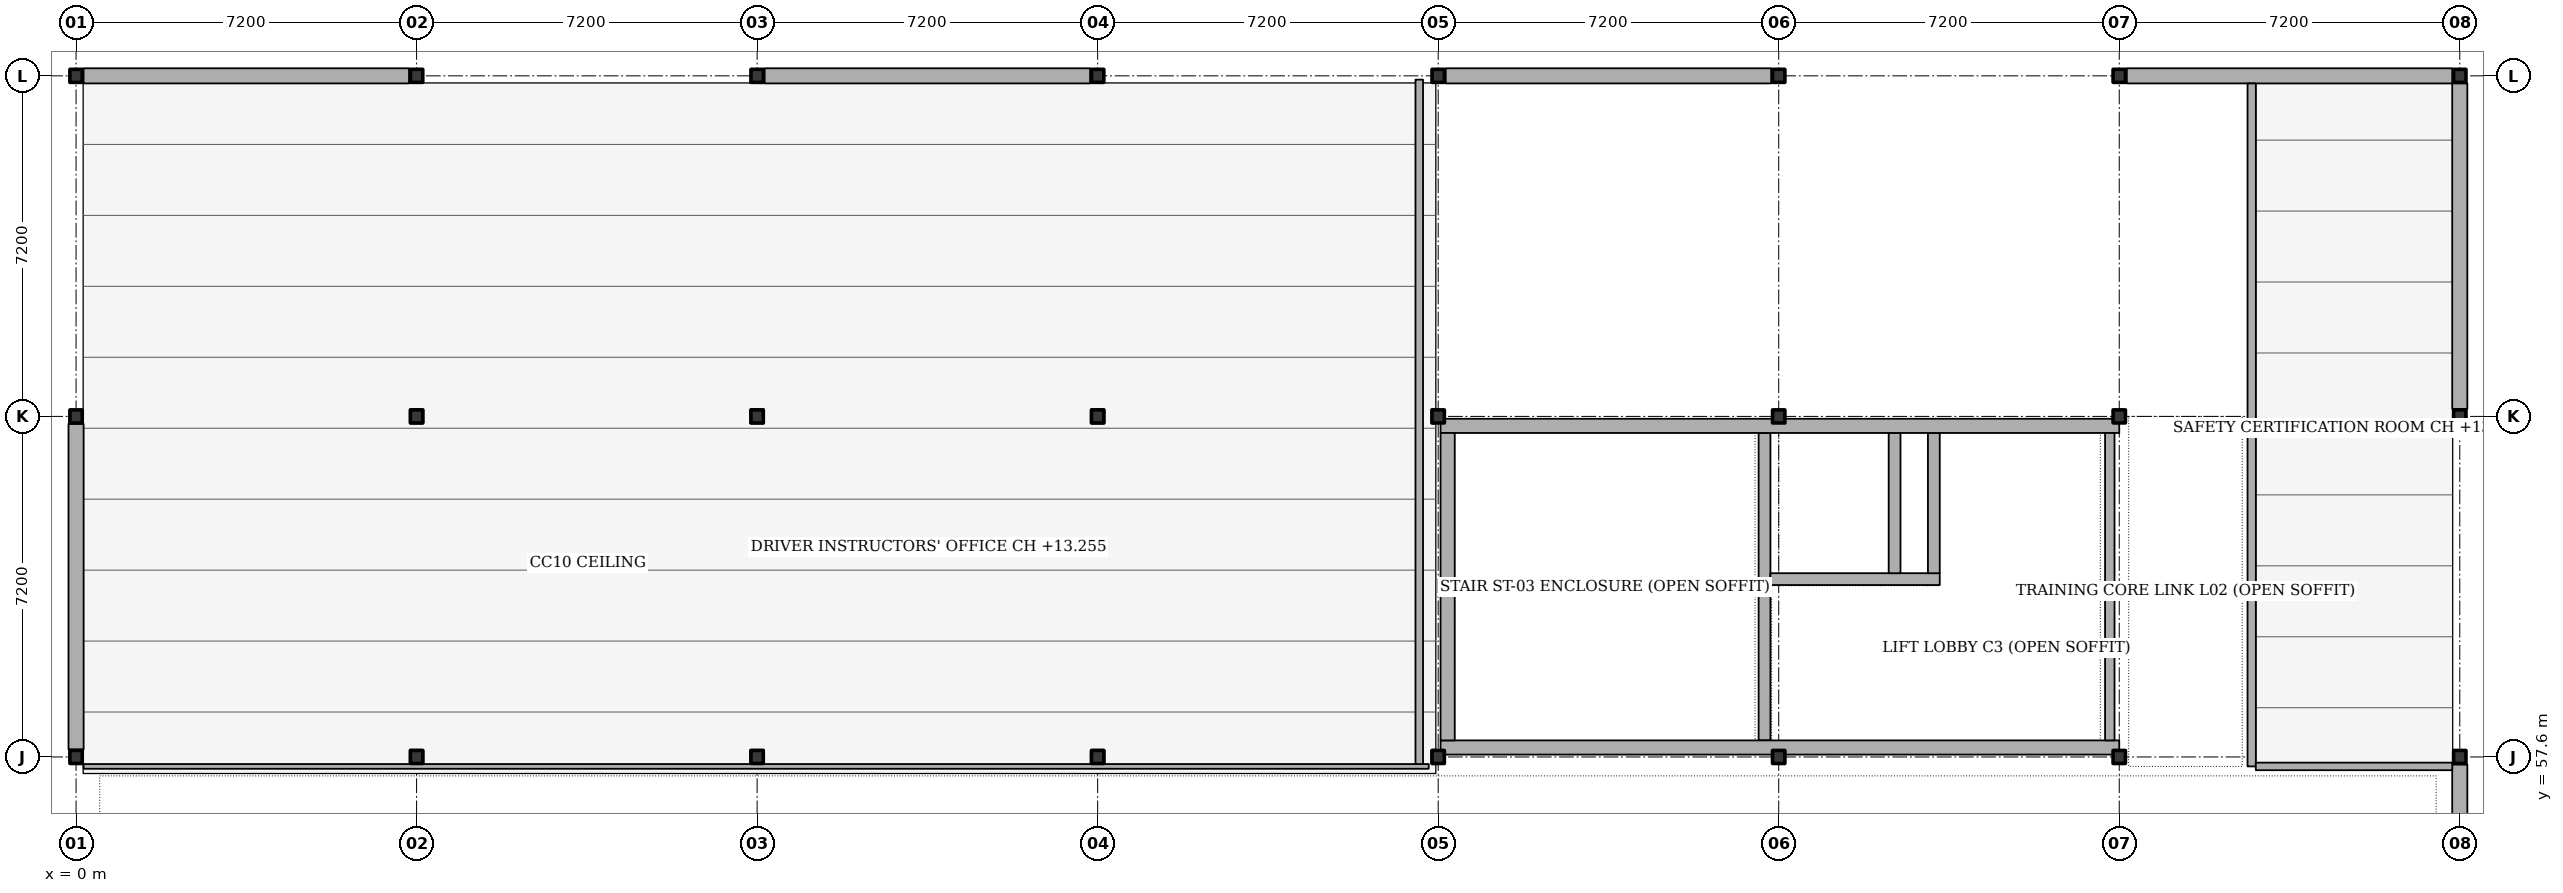
"""IFC4 building model, lengths in metres.
Left out: names, types, materials, properties, quantities, classifications, styles, units other than length and angle.
Written with IfcOpenShell. Run it as: python <this file> out.ifc"""

import sys

from ifc_helpers import new_model, si_unit, direction, frame, frame_2d, origin, origin_2d, place, context, subcontext, project, spatial, rectangle, i_section, extrude, element, fill, save


model = new_model("IFC4")
c1 = context("Model", 3, precision=1e-05, world=origin(), true_north=direction((0.0, 1.0)))
c2 = subcontext(c1, "Body", "Model", "MODEL_VIEW")
j1 = project(units=[si_unit("LENGTHUNIT", "METRE"), si_unit("PLANEANGLEUNIT", "RADIAN")], contexts=[c1])
p1 = place(None, origin())
s1 = spatial("IfcSite", under=j1, at=p1, CompositionType="ELEMENT")
p2 = place(p1, origin())
s2 = spatial("IfcBuilding", under=s1, at=p2, CompositionType="ELEMENT")
p3 = place(p2, frame((0.0, 0.0, 9.9)))
s3 = spatial("IfcBuildingStorey", under=s2, at=p3, CompositionType="ELEMENT", Elevation=9.9)
for number, where, z_axis, x_axis in (
    (1, (0.0, 57.6, 0.0), (0.0, 0.0, 1.0), (1.0, 0.0, 0.0)),
    (2, (0.0, 64.8, 0.0), (0.0, 0.0, 1.0), (1.0, 0.0, 0.0)),
    (3, (0.0, 72.0, 0.0), (0.0, 0.0, 1.0), (1.0, 0.0, 0.0)),
    (4, (7.2, 57.6, 0.0), (0.0, 0.0, 1.0), (1.0, 0.0, 0.0)),
    (5, (7.2, 64.8, 0.0), (0.0, 0.0, 1.0), (1.0, 0.0, 0.0)),
    (6, (7.2, 72.0, 0.0), (0.0, 0.0, 1.0), (1.0, 0.0, 0.0)),
    (7, (14.4, 57.6, 0.0), (0.0, 0.0, 1.0), (1.0, 0.0, 0.0)),
    (8, (14.4, 64.8, 0.0), (0.0, 0.0, 1.0), (1.0, 0.0, 0.0)),
    (9, (14.4, 72.0, 0.0), (0.0, 0.0, 1.0), (1.0, 0.0, 0.0)),
    (10, (21.6, 57.6, 0.0), (0.0, 0.0, 1.0), (1.0, 0.0, 0.0)),
    (11, (21.6, 64.8, 0.0), (0.0, 0.0, 1.0), (1.0, 0.0, 0.0)),
    (12, (21.6, 72.0, 0.0), (0.0, 0.0, 1.0), (1.0, 0.0, 0.0)),
    (13, (28.8, 57.6, 0.0), (0.0, 0.0, 1.0), (1.0, 0.0, 0.0)),
    (14, (28.8, 64.8, 0.0), (0.0, 0.0, 1.0), (1.0, 0.0, 0.0)),
    (15, (28.8, 72.0, 0.0), (0.0, 0.0, 1.0), (1.0, 0.0, 0.0)),
    (16, (36.0, 57.6, 0.0), (0.0, 0.0, 1.0), (1.0, 0.0, 0.0)),
    (17, (36.0, 64.8, 0.0), (0.0, 0.0, 1.0), (1.0, 0.0, 0.0)),
    (18, (36.0, 72.0, 0.0), (0.0, 0.0, 1.0), (1.0, 0.0, 0.0)),
    (19, (43.2, 57.6, 0.0), (0.0, 0.0, 1.0), (1.0, 0.0, 0.0)),
    (20, (43.2, 64.8, 0.0), (0.0, 0.0, 1.0), (1.0, 0.0, 0.0)),
    (21, (43.2, 72.0, 0.0), (0.0, 0.0, 1.0), (1.0, 0.0, 0.0)),
    (22, (50.4, 57.6, 0.0), (0.0, 0.0, 1.0), (1.0, 0.0, 0.0)),
    (23, (50.4, 64.8, 0.0), (0.0, 0.0, 1.0), (1.0, 0.0, 0.0)),
    (24, (50.4, 72.0, 0.0), (0.0, 0.0, 1.0), (1.0, 0.0, 0.0)),
):
    element("IfcColumn", number, at=place(p3, frame(where, z_axis=z_axis, x_axis=x_axis)), inside=s3, PredefinedType="COLUMN", context=c2, shape_type="SweptSolid", body=[
        extrude(i_section(OverallWidth=0.261, OverallDepth=0.276, WebThickness=0.015, FlangeThickness=0.025, FilletRadius=0.013, at=origin_2d()), origin(), (0.0, 0.0, 1.0), 4.5),
    ])
p4 = place(p3, frame((0.0, 57.758, 0.0), z_axis=(0.0, 0.0, 1.0), x_axis=(0.0, 1.0, 0.0)))
e25 = element("IfcWall", 25, at=p4, inside=s3, PredefinedType="SOLIDWALL", context=c2, shape_type="SweptSolid", body=[
    extrude(rectangle(XDim=6.884, YDim=0.32, at=frame_2d((3.442, 0.0))), origin(), (0.0, 0.0, 1.0), 3.8),
])
p5 = place(p4, frame((3.042, 0.0, 1.05)))
e26 = element("IfcOpeningElement", 26, at=p5, cuts=e25, PredefinedType="OPENING", context=c2, shape_type="SweptSolid", body=[
    extrude(rectangle(XDim=0.8, YDim=1.4, at=frame_2d((0.4, 0.7))), frame((0.0, 0.17, 0.0), z_axis=(0.0, -1.0, 0.0), x_axis=(1.0, 0.0, 0.0)), (0.0, 0.0, 1.0), 0.34),
])
p6 = place(p3, frame((0.158, 72.0, 0.0), z_axis=(0.0, 0.0, 1.0), x_axis=(1.0, 0.0, 0.0)))
e27 = element("IfcWall", 27, at=p6, inside=s3, PredefinedType="SOLIDWALL", context=c2, shape_type="SweptSolid", body=[
    extrude(rectangle(XDim=6.884, YDim=0.32, at=frame_2d((3.442, 0.0))), origin(), (0.0, 0.0, 1.0), 3.8),
])
p7 = place(p6, frame((2.842, 0.0, 0.0)))
e28 = element("IfcOpeningElement", 28, at=p7, cuts=e27, PredefinedType="OPENING", context=c2, shape_type="SweptSolid", body=[
    extrude(rectangle(XDim=1.2, YDim=2.15, at=frame_2d((0.6, 1.075))), frame((0.0, 0.17, 0.0), z_axis=(0.0, -1.0, 0.0), x_axis=(1.0, 0.0, 0.0)), (0.0, 0.0, 1.0), 0.34),
])
p8 = place(p3, frame((14.558, 72.0, 0.0), z_axis=(0.0, 0.0, 1.0), x_axis=(1.0, 0.0, 0.0)))
e29 = element("IfcWall", 29, at=p8, inside=s3, PredefinedType="SOLIDWALL", context=c2, shape_type="SweptSolid", body=[
    extrude(rectangle(XDim=6.884, YDim=0.32, at=frame_2d((3.442, 0.0))), origin(), (0.0, 0.0, 1.0), 3.414),
])
p9 = place(p8, frame((2.612, 0.0, 1.05)))
e30 = element("IfcOpeningElement", 30, at=p9, cuts=e29, PredefinedType="OPENING", context=c2, shape_type="SweptSolid", body=[
    extrude(rectangle(XDim=1.66, YDim=1.8, at=frame_2d((0.83, 0.9))), frame((0.0, 0.17, 0.0), z_axis=(0.0, -1.0, 0.0), x_axis=(1.0, 0.0, 0.0)), (0.0, 0.0, 1.0), 0.34),
])
p10 = place(p3, frame((28.958, 72.0, 0.0), z_axis=(0.0, 0.0, 1.0), x_axis=(1.0, 0.0, 0.0)))
e31 = element("IfcWall", 31, at=p10, inside=s3, PredefinedType="SOLIDWALL", context=c2, shape_type="SweptSolid", body=[
    extrude(rectangle(XDim=6.884, YDim=0.32, at=frame_2d((3.442, 0.0))), origin(), (0.0, 0.0, 1.0), 3.503),
])
p11 = place(p10, frame((2.162, 0.0, 1.05)))
e32 = element("IfcOpeningElement", 32, at=p11, cuts=e31, PredefinedType="OPENING", context=c2, shape_type="SweptSolid", body=[
    extrude(rectangle(XDim=2.56, YDim=1.55, at=frame_2d((1.28, 0.775))), frame((0.0, 0.17, 0.0), z_axis=(0.0, -1.0, 0.0), x_axis=(1.0, 0.0, 0.0)), (0.0, 0.0, 1.0), 0.34),
])
p12 = place(p3, frame((43.358, 72.0, 0.0), z_axis=(0.0, 0.0, 1.0), x_axis=(1.0, 0.0, 0.0)))
e33 = element("IfcWall", 33, at=p12, inside=s3, PredefinedType="SOLIDWALL", context=c2, shape_type="SweptSolid", body=[
    extrude(rectangle(XDim=6.884, YDim=0.32, at=frame_2d((3.442, 0.0))), origin(), (0.0, 0.0, 1.0), 3.615),
])
p13 = place(p12, frame((3.638, 0.0, 1.05)))
e34 = element("IfcOpeningElement", 34, at=p13, cuts=e33, PredefinedType="OPENING", context=c2, shape_type="SweptSolid", body=[
    extrude(rectangle(XDim=2.1, YDim=1.8, at=frame_2d((1.05, 0.9))), frame((0.0, 0.17, 0.0), z_axis=(0.0, -1.0, 0.0), x_axis=(1.0, 0.0, 0.0)), (0.0, 0.0, 1.0), 0.34),
])
p14 = place(p3, frame((50.4, 71.842, 0.0), z_axis=(0.0, 0.0, 1.0), x_axis=(0.0, -1.0, 0.0)))
e35 = element("IfcWall", 35, at=p14, inside=s3, PredefinedType="SOLIDWALL", context=c2, shape_type="SweptSolid", body=[
    extrude(rectangle(XDim=6.884, YDim=0.32, at=frame_2d((3.442, 0.0))), origin(), (0.0, 0.0, 1.0), 3.615),
])
p15 = place(p14, frame((2.642, 0.0, 0.0)))
e36 = element("IfcOpeningElement", 36, at=p15, cuts=e35, PredefinedType="OPENING", context=c2, shape_type="SweptSolid", body=[
    extrude(rectangle(XDim=1.6, YDim=2.2, at=frame_2d((0.8, 1.1))), frame((0.0, 0.17, 0.0), z_axis=(0.0, -1.0, 0.0), x_axis=(1.0, 0.0, 0.0)), (0.0, 0.0, 1.0), 0.34),
])
p16 = place(p3, frame((50.4, 57.442, 0.0), z_axis=(0.0, 0.0, 1.0), x_axis=(0.0, -1.0, 0.0)))
e37 = element("IfcWall", 37, at=p16, inside=s3, PredefinedType="SOLIDWALL", context=c2, shape_type="SweptSolid", body=[
    extrude(rectangle(XDim=6.884, YDim=0.32, at=frame_2d((3.442, 0.0))), origin(), (0.0, 0.0, 1.0), 3.414),
])
p17 = place(p16, frame((4.058, 0.0, 1.05)))
e38 = element("IfcOpeningElement", 38, at=p17, cuts=e37, PredefinedType="OPENING", context=c2, shape_type="SweptSolid", body=[
    extrude(rectangle(XDim=1.66, YDim=1.8, at=frame_2d((0.83, 0.9))), frame((0.0, 0.17, 0.0), z_axis=(0.0, -1.0, 0.0), x_axis=(1.0, 0.0, 0.0)), (0.0, 0.0, 1.0), 0.34),
])
p18 = place(p3, frame((35.7, 57.95, 0.0), z_axis=(0.0, 0.0, 1.0), x_axis=(0.0, 1.0, 0.0)))
e39 = element("IfcWall", 39, at=p18, inside=s3, PredefinedType="SHEAR", context=c2, shape_type="SweptSolid", body=[
    extrude(rectangle(XDim=6.5, YDim=0.25, at=frame_2d((3.25, 0.0))), origin(), (0.0, 0.0, 1.0), 3.6),
])
p19 = place(p18, frame((0.95, 0.0, 0.0)))
e40 = element("IfcOpeningElement", 40, at=p19, cuts=e39, PredefinedType="OPENING", context=c2, shape_type="SweptSolid", body=[
    extrude(rectangle(XDim=1.35, YDim=2.15, at=frame_2d((0.675, 1.075))), frame((0.0, 0.135, 0.0), z_axis=(0.0, -1.0, 0.0), x_axis=(1.0, 0.0, 0.0)), (0.0, 0.0, 1.0), 0.27),
])
p20 = place(p3, frame((35.825, 61.36, 0.0), z_axis=(0.0, 0.0, 1.0), x_axis=(1.0, 0.0, 0.0)))
e41 = element("IfcWall", 41, at=p20, inside=s3, PredefinedType="SHEAR", context=c2, shape_type="SweptSolid", body=[
    extrude(rectangle(XDim=3.58, YDim=0.25, at=frame_2d((1.79, 0.0))), origin(), (0.0, 0.0, 1.0), 3.6),
])
p21 = place(p20, frame((0.775, 0.0, 0.0)))
e42 = element("IfcOpeningElement", 42, at=p21, cuts=e41, PredefinedType="OPENING", context=c2, shape_type="SweptSolid", body=[
    extrude(rectangle(XDim=1.1, YDim=2.15, at=frame_2d((0.55, 1.075))), frame((0.0, 0.135, 0.0), z_axis=(0.0, -1.0, 0.0), x_axis=(1.0, 0.0, 0.0)), (0.0, 0.0, 1.0), 0.27),
])
p22 = place(p3, frame((38.45, 61.485, 0.0), z_axis=(0.0, 0.0, 1.0), x_axis=(0.0, 1.0, 0.0)))
e43 = element("IfcWall", 43, at=p22, inside=s3, PredefinedType="SHEAR", context=c2, shape_type="SweptSolid", body=[
    extrude(rectangle(XDim=2.965, YDim=0.25, at=frame_2d((1.482, 0.0))), origin(), (0.0, 0.0, 1.0), 3.6),
])
p23 = place(p3, frame((39.28, 61.485, 0.0), z_axis=(0.0, 0.0, 1.0), x_axis=(0.0, 1.0, 0.0)))
e44 = element("IfcWall", 44, at=p23, inside=s3, PredefinedType="SHEAR", context=c2, shape_type="SweptSolid", body=[
    extrude(rectangle(XDim=2.965, YDim=0.25, at=frame_2d((1.482, 0.0))), origin(), (0.0, 0.0, 1.0), 3.6),
])
p24 = place(p23, frame((0.9, 0.0, 0.0)))
e45 = element("IfcOpeningElement", 45, at=p24, cuts=e44, PredefinedType="OPENING", context=c2, shape_type="SweptSolid", body=[
    extrude(rectangle(XDim=0.92, YDim=2.05, at=frame_2d((0.46, 1.025))), frame((0.0, 0.135, 0.0), z_axis=(0.0, -1.0, 0.0), x_axis=(1.0, 0.0, 0.0)), (0.0, 0.0, 1.0), 0.27),
])
p25 = place(p3, frame((28.85, 57.8, 0.0), z_axis=(0.0, 0.0, 1.0), x_axis=(1.0, 0.0, 0.0)))
e46 = element("IfcWall", 46, at=p25, inside=s3, PredefinedType="SHEAR", context=c2, shape_type="SweptSolid", body=[
    extrude(rectangle(XDim=14.35, YDim=0.3, at=frame_2d((7.175, 0.0))), origin(), (0.0, 0.0, 1.0), 3.6),
])
p26 = place(p25, frame((11.5, 0.0, 0.0)))
e47 = element("IfcOpeningElement", 47, at=p26, cuts=e46, PredefinedType="OPENING", context=c2, shape_type="SweptSolid", body=[
    extrude(rectangle(XDim=1.5, YDim=2.15, at=frame_2d((0.75, 1.075))), frame((0.0, 0.16, 0.0), z_axis=(0.0, -1.0, 0.0), x_axis=(1.0, 0.0, 0.0)), (0.0, 0.0, 1.0), 0.32),
])
p27 = place(p3, frame((28.85, 64.6, 0.0), z_axis=(0.0, 0.0, 1.0), x_axis=(1.0, 0.0, 0.0)))
e48 = element("IfcWall", 48, at=p27, inside=s3, PredefinedType="SHEAR", context=c2, shape_type="SweptSolid", body=[
    extrude(rectangle(XDim=14.35, YDim=0.3, at=frame_2d((7.175, 0.0))), origin(), (0.0, 0.0, 1.0), 3.6),
])
p28 = place(p3, frame((29.0, 57.95, 0.0), z_axis=(0.0, 0.0, 1.0), x_axis=(0.0, 1.0, 0.0)))
e49 = element("IfcWall", 49, at=p28, inside=s3, PredefinedType="SHEAR", context=c2, shape_type="SweptSolid", body=[
    extrude(rectangle(XDim=6.5, YDim=0.3, at=frame_2d((3.25, 0.0))), origin(), (0.0, 0.0, 1.0), 3.6),
])
p29 = place(p3, frame((43.0, 57.95, 0.0), z_axis=(0.0, 0.0, 1.0), x_axis=(0.0, 1.0, 0.0)))
e50 = element("IfcWall", 50, at=p29, inside=s3, PredefinedType="SOLIDWALL", context=c2, shape_type="SweptSolid", body=[
    extrude(rectangle(XDim=6.5, YDim=0.2, at=frame_2d((3.25, 0.0))), origin(), (0.0, 0.0, 1.0), 3.6),
])
p30 = place(p3, frame((0.16, 57.4, 0.0), z_axis=(0.0, 0.0, 1.0), x_axis=(1.0, 0.0, 0.0)))
e51 = element("IfcWall", 51, at=p30, inside=s3, PredefinedType="PARTITIONING", context=c2, shape_type="SweptSolid", body=[
    extrude(rectangle(XDim=28.44, YDim=0.1, at=frame_2d((14.22, 0.0))), origin(), (0.0, 0.0, 1.0), 3.55),
])
p31 = place(p30, frame((16.947, 0.0, 0.0)))
e52 = element("IfcOpeningElement", 52, at=p31, cuts=e51, PredefinedType="OPENING", context=c2, shape_type="SweptSolid", body=[
    extrude(rectangle(XDim=1.28, YDim=2.18, at=frame_2d((0.64, 1.09))), frame((0.0, 0.06, 0.0), z_axis=(0.0, -1.0, 0.0), x_axis=(1.0, 0.0, 0.0)), (0.0, 0.0, 1.0), 0.12),
])
p32 = place(p3, frame((46.0, 57.4, 0.0), z_axis=(0.0, 0.0, 1.0), x_axis=(0.0, 1.0, 0.0)))
e53 = element("IfcWall", 53, at=p32, inside=s3, PredefinedType="PARTITIONING", context=c2, shape_type="SweptSolid", body=[
    extrude(rectangle(XDim=14.44, YDim=0.175, at=frame_2d((7.22, 0.0))), origin(), (0.0, 0.0, 1.0), 3.55),
])
p33 = place(p32, frame((3.275, 0.0, 0.0)))
e54 = element("IfcOpeningElement", 54, at=p33, cuts=e53, PredefinedType="OPENING", context=c2, shape_type="SweptSolid", body=[
    extrude(rectangle(XDim=1.05, YDim=2.15, at=frame_2d((0.525, 1.075))), frame((0.0, 0.097, 0.0), z_axis=(0.0, -1.0, 0.0), x_axis=(1.0, 0.0, 0.0)), (0.0, 0.0, 1.0), 0.195),
])
p34 = place(p3, frame((28.4, 57.45, 0.0), z_axis=(0.0, 0.0, 1.0), x_axis=(0.0, 1.0, 0.0)))
e55 = element("IfcWall", 55, at=p34, inside=s3, PredefinedType="PARTITIONING", context=c2, shape_type="SweptSolid", body=[
    extrude(rectangle(XDim=14.47, YDim=0.16, at=frame_2d((7.235, 0.0))), origin(), (0.0, 0.0, 1.0), 3.404),
])
p35 = place(p3, frame((46.087, 57.4, 0.0), z_axis=(0.0, 0.0, 1.0), x_axis=(1.0, 0.0, 0.0)))
e56 = element("IfcWall", 56, at=p35, inside=s3, PredefinedType="PARTITIONING", context=c2, shape_type="SweptSolid", body=[
    extrude(rectangle(XDim=4.153, YDim=0.16, at=frame_2d((2.077, 0.0))), origin(), (0.0, 0.0, 1.0), 3.55),
])
p36 = place(p5, origin())
e57 = element("IfcWindow", 57, at=p36, inside=s3, PartitioningType="SINGLE_PANEL", PredefinedType="WINDOW", context=c2, shape_type="SweptSolid", body=[
    extrude(rectangle(XDim=0.8, YDim=1.4, at=frame_2d((0.4, 0.7))), frame((0.0, 0.03, 0.0), z_axis=(0.0, -1.0, 0.0), x_axis=(1.0, 0.0, 0.0)), (0.0, 0.0, 1.0), 0.06),
])
fill(e26, e57)
p37 = place(p9, origin())
e58 = element("IfcWindow", 58, at=p37, inside=s3, PartitioningType="SINGLE_PANEL", PredefinedType="WINDOW", context=c2, shape_type="SweptSolid", body=[
    extrude(rectangle(XDim=1.66, YDim=1.8, at=frame_2d((0.83, 0.9))), frame((0.0, 0.03, 0.0), z_axis=(0.0, -1.0, 0.0), x_axis=(1.0, 0.0, 0.0)), (0.0, 0.0, 1.0), 0.06),
])
fill(e30, e58)
p38 = place(p11, origin())
e59 = element("IfcWindow", 59, at=p38, inside=s3, PartitioningType="SINGLE_PANEL", PredefinedType="WINDOW", context=c2, shape_type="SweptSolid", body=[
    extrude(rectangle(XDim=2.56, YDim=1.55, at=frame_2d((1.28, 0.775))), frame((0.0, 0.03, 0.0), z_axis=(0.0, -1.0, 0.0), x_axis=(1.0, 0.0, 0.0)), (0.0, 0.0, 1.0), 0.06),
])
fill(e32, e59)
p39 = place(p13, origin())
e60 = element("IfcWindow", 60, at=p39, inside=s3, PartitioningType="SINGLE_PANEL", PredefinedType="WINDOW", context=c2, shape_type="SweptSolid", body=[
    extrude(rectangle(XDim=2.1, YDim=1.8, at=frame_2d((1.05, 0.9))), frame((0.0, 0.03, 0.0), z_axis=(0.0, -1.0, 0.0), x_axis=(1.0, 0.0, 0.0)), (0.0, 0.0, 1.0), 0.06),
])
fill(e34, e60)
p40 = place(p15, origin())
e61 = element("IfcDoor", 61, at=p40, inside=s3, OperationType="SINGLE_SWING_LEFT", PredefinedType="DOOR", context=c2, shape_type="SweptSolid", body=[
    extrude(rectangle(XDim=1.6, YDim=2.2, at=frame_2d((0.8, 1.1))), frame((0.0, 0.025, 0.0), z_axis=(0.0, -1.0, 0.0), x_axis=(1.0, 0.0, 0.0)), (0.0, 0.0, 1.0), 0.05),
])
fill(e36, e61)
p41 = place(p7, origin())
e62 = element("IfcDoor", 62, at=p41, inside=s3, OperationType="SINGLE_SWING_RIGHT", PredefinedType="DOOR", context=c2, shape_type="SweptSolid", body=[
    extrude(rectangle(XDim=1.2, YDim=2.15, at=frame_2d((0.6, 1.075))), frame((0.0, 0.025, 0.0), z_axis=(0.0, -1.0, 0.0), x_axis=(1.0, 0.0, 0.0)), (0.0, 0.0, 1.0), 0.05),
])
fill(e28, e62)
p42 = place(p19, origin())
e63 = element("IfcDoor", 63, at=p42, inside=s3, OperationType="SINGLE_SWING_RIGHT", PredefinedType="DOOR", context=c2, shape_type="SweptSolid", body=[
    extrude(rectangle(XDim=1.35, YDim=2.15, at=frame_2d((0.675, 1.075))), frame((0.0, 0.025, 0.0), z_axis=(0.0, -1.0, 0.0), x_axis=(1.0, 0.0, 0.0)), (0.0, 0.0, 1.0), 0.05),
])
fill(e40, e63)
p43 = place(p21, origin())
e64 = element("IfcDoor", 64, at=p43, inside=s3, OperationType="SLIDING_TO_LEFT", PredefinedType="DOOR", context=c2, shape_type="SweptSolid", body=[
    extrude(rectangle(XDim=1.1, YDim=2.15, at=frame_2d((0.55, 1.075))), frame((0.0, 0.025, 0.0), z_axis=(0.0, -1.0, 0.0), x_axis=(1.0, 0.0, 0.0)), (0.0, 0.0, 1.0), 0.05),
])
fill(e42, e64)
p44 = place(p24, origin())
e65 = element("IfcDoor", 65, at=p44, inside=s3, OperationType="SINGLE_SWING_LEFT", PredefinedType="DOOR", context=c2, shape_type="SweptSolid", body=[
    extrude(rectangle(XDim=0.92, YDim=2.05, at=frame_2d((0.46, 1.025))), frame((0.0, 0.025, 0.0), z_axis=(0.0, -1.0, 0.0), x_axis=(1.0, 0.0, 0.0)), (0.0, 0.0, 1.0), 0.05),
])
fill(e45, e65)
p45 = place(p26, origin())
e66 = element("IfcDoor", 66, at=p45, inside=s3, OperationType="SINGLE_SWING_RIGHT", PredefinedType="DOOR", context=c2, shape_type="SweptSolid", body=[
    extrude(rectangle(XDim=1.5, YDim=2.15, at=frame_2d((0.75, 1.075))), frame((0.0, 0.025, 0.0), z_axis=(0.0, -1.0, 0.0), x_axis=(1.0, 0.0, 0.0)), (0.0, 0.0, 1.0), 0.05),
])
fill(e47, e66)
p46 = place(p31, origin())
e67 = element("IfcDoor", 67, at=p46, inside=s3, OperationType="SINGLE_SWING_RIGHT", PredefinedType="DOOR", context=c2, shape_type="SweptSolid", body=[
    extrude(rectangle(XDim=1.28, YDim=2.18, at=frame_2d((0.64, 1.09))), frame((0.0, 0.025, 0.0), z_axis=(0.0, -1.0, 0.0), x_axis=(1.0, 0.0, 0.0)), (0.0, 0.0, 1.0), 0.05),
])
fill(e52, e67)
p47 = place(p33, origin())
e68 = element("IfcDoor", 68, at=p47, inside=s3, OperationType="SINGLE_SWING_LEFT", PredefinedType="DOOR", context=c2, shape_type="SweptSolid", body=[
    extrude(rectangle(XDim=1.05, YDim=2.15, at=frame_2d((0.525, 1.075))), frame((0.0, 0.025, 0.0), z_axis=(0.0, -1.0, 0.0), x_axis=(1.0, 0.0, 0.0)), (0.0, 0.0, 1.0), 0.05),
])
fill(e54, e68)
save(model, sys.argv[1])
